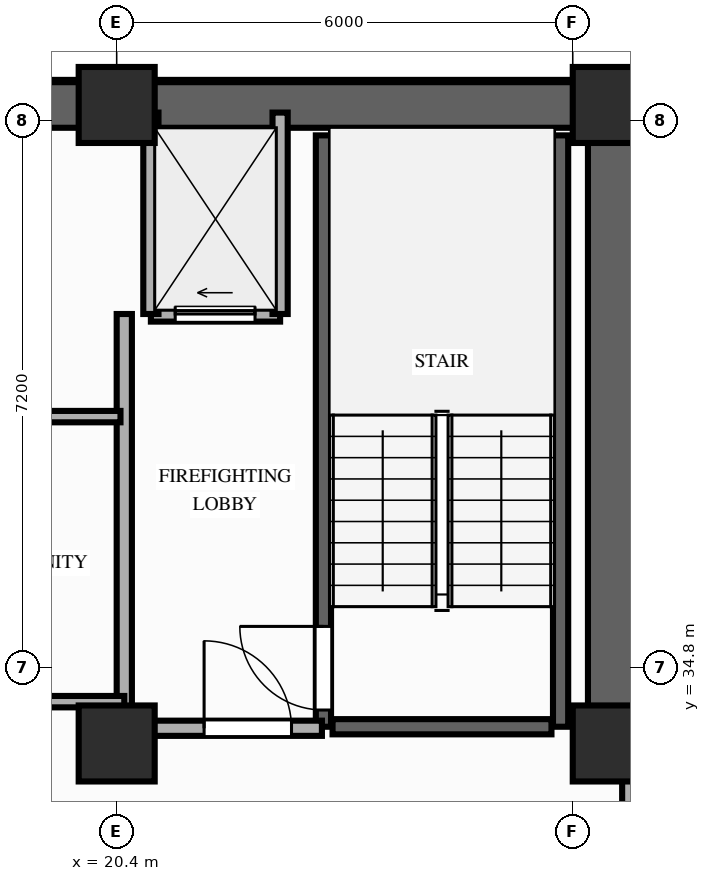
"""IFC4 building model, lengths in metres.
Left out: names, types, materials, properties, quantities, classifications, styles, units other than length and angle.
Written with IfcOpenShell. Run it as: python <this file> out.ifc"""

import sys

from ifc_helpers import new_model, si_unit, direction, frame, frame_2d, origin, origin_2d, place, context, subcontext, project, spatial, rectangle, extrude, element, fill, save


model = new_model("IFC4")
c1 = context("Model", 3, precision=1e-05, world=origin(), true_north=direction((0.0, 1.0)))
c2 = subcontext(c1, "Body", "Model", "MODEL_VIEW")
j1 = project(units=[si_unit("LENGTHUNIT", "METRE"), si_unit("PLANEANGLEUNIT", "RADIAN")], contexts=[c1])
p1 = place(None, origin())
s1 = spatial("IfcSite", under=j1, at=p1, CompositionType="ELEMENT")
p2 = place(p1, origin())
s2 = spatial("IfcBuilding", under=s1, at=p2, CompositionType="ELEMENT")
p3 = place(p2, frame((0.0, 0.0, 179.2)))
s3 = spatial("IfcBuildingStorey", under=s2, at=p3, CompositionType="ELEMENT", Elevation=179.2)
for number, where, z_axis, x_axis in (
    (1, (20.4, 33.8, 0.0), (0.0, 0.0, 1.0), (1.0, 0.0, 0.0)),
    (2, (26.9, 33.8, 0.0), (0.0, 0.0, 1.0), (1.0, 0.0, 0.0)),
    (3, (20.4, 42.2, 0.0), (0.0, 0.0, 1.0), (1.0, 0.0, 0.0)),
    (4, (26.9, 42.2, 0.0), (0.0, 0.0, 1.0), (1.0, 0.0, 0.0)),
):
    element("IfcColumn", number, at=place(p3, frame(where, z_axis=z_axis, x_axis=x_axis)), inside=s3, PredefinedType="COLUMN", context=c2, shape_type="SweptSolid", body=[
        extrude(rectangle(XDim=1.0, YDim=1.0, at=origin_2d()), origin(), (0.0, 0.0, 1.0), 3.2),
    ])
p4 = place(p3, frame((6.45, 42.2, 0.0), z_axis=(0.0, 0.0, 1.0), x_axis=(1.0, 0.0, 0.0)))
e5 = element("IfcWall", 5, at=p4, inside=s3, PredefinedType="SHEAR", context=c2, shape_type="SweptSolid", body=[
    extrude(rectangle(XDim=20.45, YDim=0.6, at=frame_2d((10.225, 0.0))), origin(), (0.0, 0.0, 1.0), 3.02),
])
p5 = place(p3, frame((26.9, 33.8, 0.0), z_axis=(0.0, 0.0, 1.0), x_axis=(0.0, 1.0, 0.0)))
e6 = element("IfcWall", 6, at=p5, inside=s3, PredefinedType="SHEAR", context=c2, shape_type="SweptSolid", body=[
    extrude(rectangle(XDim=7.95, YDim=0.6, at=frame_2d((3.975, 0.0))), origin(), (0.0, 0.0, 1.0), 3.02),
])
p6 = place(p3, frame((23.12, 34.02, 0.0), z_axis=(0.0, 0.0, 1.0), x_axis=(0.0, 1.0, 0.0)))
e7 = element("IfcWall", 7, at=p6, inside=s3, PredefinedType="SHEAR", context=c2, shape_type="SweptSolid", body=[
    extrude(rectangle(XDim=7.78, YDim=0.2, at=frame_2d((3.89, 0.0))), origin(), (0.0, 0.0, 1.0), 3.02),
])
p7 = place(p6, frame((0.22, 0.0, 0.0)))
e8 = element("IfcOpeningElement", 8, at=p7, cuts=e7, PredefinedType="OPENING", context=c2, shape_type="SweptSolid", body=[
    extrude(rectangle(XDim=1.1, YDim=2.15, at=frame_2d((0.55, 1.075))), frame((0.0, 0.11, 0.0), z_axis=(0.0, -1.0, 0.0), x_axis=(1.0, 0.0, 0.0)), (0.0, 0.0, 1.0), 0.22),
])
p8 = place(p3, frame((26.24, 34.02, 0.0), z_axis=(0.0, 0.0, 1.0), x_axis=(0.0, 1.0, 0.0)))
e9 = element("IfcWall", 9, at=p8, inside=s3, PredefinedType="SHEAR", context=c2, shape_type="SweptSolid", body=[
    extrude(rectangle(XDim=7.78, YDim=0.2, at=frame_2d((3.89, 0.0))), origin(), (0.0, 0.0, 1.0), 3.02),
])
p9 = place(p3, frame((23.24, 34.02, 0.0), z_axis=(0.0, 0.0, 1.0), x_axis=(1.0, 0.0, 0.0)))
e10 = element("IfcWall", 10, at=p9, inside=s3, PredefinedType="SHEAR", context=c2, shape_type="SweptSolid", body=[
    extrude(rectangle(XDim=2.88, YDim=0.2, at=frame_2d((1.44, 0.0))), origin(), (0.0, 0.0, 1.0), 3.02),
])
p10 = place(p3, frame((20.85, 39.45, 0.0), z_axis=(0.0, 0.0, 1.0), x_axis=(1.0, 0.0, 0.0)))
e11 = element("IfcWall", 11, at=p10, inside=s3, PredefinedType="MOVABLE", context=c2, shape_type="SweptSolid", body=[
    extrude(rectangle(XDim=1.7, YDim=0.2, at=frame_2d((0.85, 0.0))), origin(), (0.0, 0.0, 1.0), 3.02),
])
p11 = place(p10, frame((0.32, 0.0, 0.0)))
e12 = element("IfcOpeningElement", 12, at=p11, cuts=e11, PredefinedType="OPENING", context=c2, shape_type="SweptSolid", body=[
    extrude(rectangle(XDim=1.05, YDim=2.15, at=frame_2d((0.525, 1.075))), frame((0.0, 0.11, 0.0), z_axis=(0.0, -1.0, 0.0), x_axis=(1.0, 0.0, 0.0)), (0.0, 0.0, 1.0), 0.22),
])
for number, where, z_axis, x_axis in (
    (13, (20.85, 39.45, 0.0), (0.0, 0.0, 1.0), (0.0, 1.0, 0.0)),
    (14, (22.55, 39.45, 0.0), (0.0, 0.0, 1.0), (0.0, 1.0, 0.0)),
):
    element("IfcWall", number, at=place(p3, frame(where, z_axis=z_axis, x_axis=x_axis)), inside=s3, PredefinedType="MOVABLE", context=c2, shape_type="SweptSolid", body=[
        extrude(rectangle(XDim=2.65, YDim=0.2, at=frame_2d((1.325, 0.0))), origin(), (0.0, 0.0, 1.0), 2.45),
    ])
p12 = place(p3, frame((20.5, 34.0, 0.0), z_axis=(0.0, 0.0, 1.0), x_axis=(0.0, 1.0, 0.0)))
e15 = element("IfcWall", 15, at=p12, inside=s3, PredefinedType="PARTITIONING", context=c2, shape_type="SweptSolid", body=[
    extrude(rectangle(XDim=5.45, YDim=0.2, at=frame_2d((2.725, 0.0))), origin(), (0.0, 0.0, 1.0), 2.45),
])
p13 = place(p3, frame((20.5, 34.0, 0.0), z_axis=(0.0, 0.0, 1.0), x_axis=(1.0, 0.0, 0.0)))
e16 = element("IfcWall", 16, at=p13, inside=s3, PredefinedType="PARTITIONING", context=c2, shape_type="SweptSolid", body=[
    extrude(rectangle(XDim=2.6, YDim=0.2, at=frame_2d((1.3, 0.0))), origin(), (0.0, 0.0, 1.0), 2.45),
])
p14 = place(p13, frame((1.05, 0.0, 0.0)))
e17 = element("IfcOpeningElement", 17, at=p14, cuts=e16, PredefinedType="OPENING", context=c2, shape_type="SweptSolid", body=[
    extrude(rectangle(XDim=1.15, YDim=2.15, at=frame_2d((0.575, 1.075))), frame((0.0, 0.11, 0.0), z_axis=(0.0, -1.0, 0.0), x_axis=(1.0, 0.0, 0.0)), (0.0, 0.0, 1.0), 0.22),
])
p15 = place(p3, frame((12.9, 34.35, 0.0), z_axis=(0.0, 0.0, 1.0), x_axis=(1.0, 0.0, 0.0)))
e18 = element("IfcWall", 18, at=p15, inside=s3, PredefinedType="PARTITIONING", context=c2, shape_type="SweptSolid", body=[
    extrude(rectangle(XDim=7.6, YDim=0.15, at=frame_2d((3.8, 0.0))), origin(), (0.0, 0.0, 1.0), 3.02),
])
p16 = place(p15, frame((1.4, 0.0, 0.0)))
e19 = element("IfcOpeningElement", 19, at=p16, cuts=e18, PredefinedType="OPENING", context=c2, shape_type="SweptSolid", body=[
    extrude(rectangle(XDim=0.95, YDim=2.15, at=frame_2d((0.475, 1.075))), frame((0.0, 0.085, 0.0), z_axis=(0.0, -1.0, 0.0), x_axis=(1.0, 0.0, 0.0)), (0.0, 0.0, 1.0), 0.17),
])
p17 = place(p15, frame((4.6, 0.0, 0.0)))
e20 = element("IfcOpeningElement", 20, at=p17, cuts=e18, PredefinedType="OPENING", context=c2, shape_type="SweptSolid", body=[
    extrude(rectangle(XDim=0.95, YDim=2.15, at=frame_2d((0.475, 1.075))), frame((0.0, 0.085, 0.0), z_axis=(0.0, -1.0, 0.0), x_axis=(1.0, 0.0, 0.0)), (0.0, 0.0, 1.0), 0.17),
])
p18 = place(p3, frame((16.7, 38.1, 0.0), z_axis=(0.0, 0.0, 1.0), x_axis=(1.0, 0.0, 0.0)))
e21 = element("IfcWall", 21, at=p18, inside=s3, PredefinedType="PARTITIONING", context=c2, shape_type="SweptSolid", body=[
    extrude(rectangle(XDim=3.75, YDim=0.15, at=frame_2d((1.875, 0.0))), origin(), (0.0, 0.0, 1.0), 3.02),
])
p19 = place(p18, frame((1.45, 0.0, 0.0)))
e22 = element("IfcOpeningElement", 22, at=p19, cuts=e21, PredefinedType="OPENING", context=c2, shape_type="SweptSolid", body=[
    extrude(rectangle(XDim=0.85, YDim=2.05, at=frame_2d((0.425, 1.025))), frame((0.0, 0.085, 0.0), z_axis=(0.0, -1.0, 0.0), x_axis=(1.0, 0.0, 0.0)), (0.0, 0.0, 1.0), 0.17),
])
p20 = place(p3, frame((27.15, 32.0, 0.0), z_axis=(0.0, 0.0, 1.0), x_axis=(0.0, 1.0, 0.0)))
e23 = element("IfcWall", 23, at=p20, inside=s3, PredefinedType="PARTITIONING", context=c2, shape_type="SweptSolid", body=[
    extrude(rectangle(XDim=1.68, YDim=0.2, at=frame_2d((0.84, 0.0))), origin(), (0.0, 0.0, 1.0), 2.45),
])
p21 = place(p7, origin())
e24 = element("IfcDoor", 24, at=p21, inside=s3, OperationType="SINGLE_SWING_RIGHT", PredefinedType="DOOR", context=c2, shape_type="SweptSolid", body=[
    extrude(rectangle(XDim=1.1, YDim=2.15, at=frame_2d((0.55, 1.075))), frame((0.0, 0.025, 0.0), z_axis=(0.0, -1.0, 0.0), x_axis=(1.0, 0.0, 0.0)), (0.0, 0.0, 1.0), 0.05),
])
fill(e8, e24)
p22 = place(p11, origin())
e25 = element("IfcDoor", 25, at=p22, inside=s3, OperationType="SLIDING_TO_LEFT", PredefinedType="DOOR", context=c2, shape_type="SweptSolid", body=[
    extrude(rectangle(XDim=1.05, YDim=2.15, at=frame_2d((0.525, 1.075))), frame((0.0, 0.025, 0.0), z_axis=(0.0, -1.0, 0.0), x_axis=(1.0, 0.0, 0.0)), (0.0, 0.0, 1.0), 0.05),
])
fill(e12, e25)
p23 = place(p14, origin())
e26 = element("IfcDoor", 26, at=p23, inside=s3, OperationType="SINGLE_SWING_LEFT", PredefinedType="DOOR", context=c2, shape_type="SweptSolid", body=[
    extrude(rectangle(XDim=1.15, YDim=2.15, at=frame_2d((0.575, 1.075))), frame((0.0, 0.025, 0.0), z_axis=(0.0, -1.0, 0.0), x_axis=(1.0, 0.0, 0.0)), (0.0, 0.0, 1.0), 0.05),
])
fill(e17, e26)
save(model, sys.argv[1])
